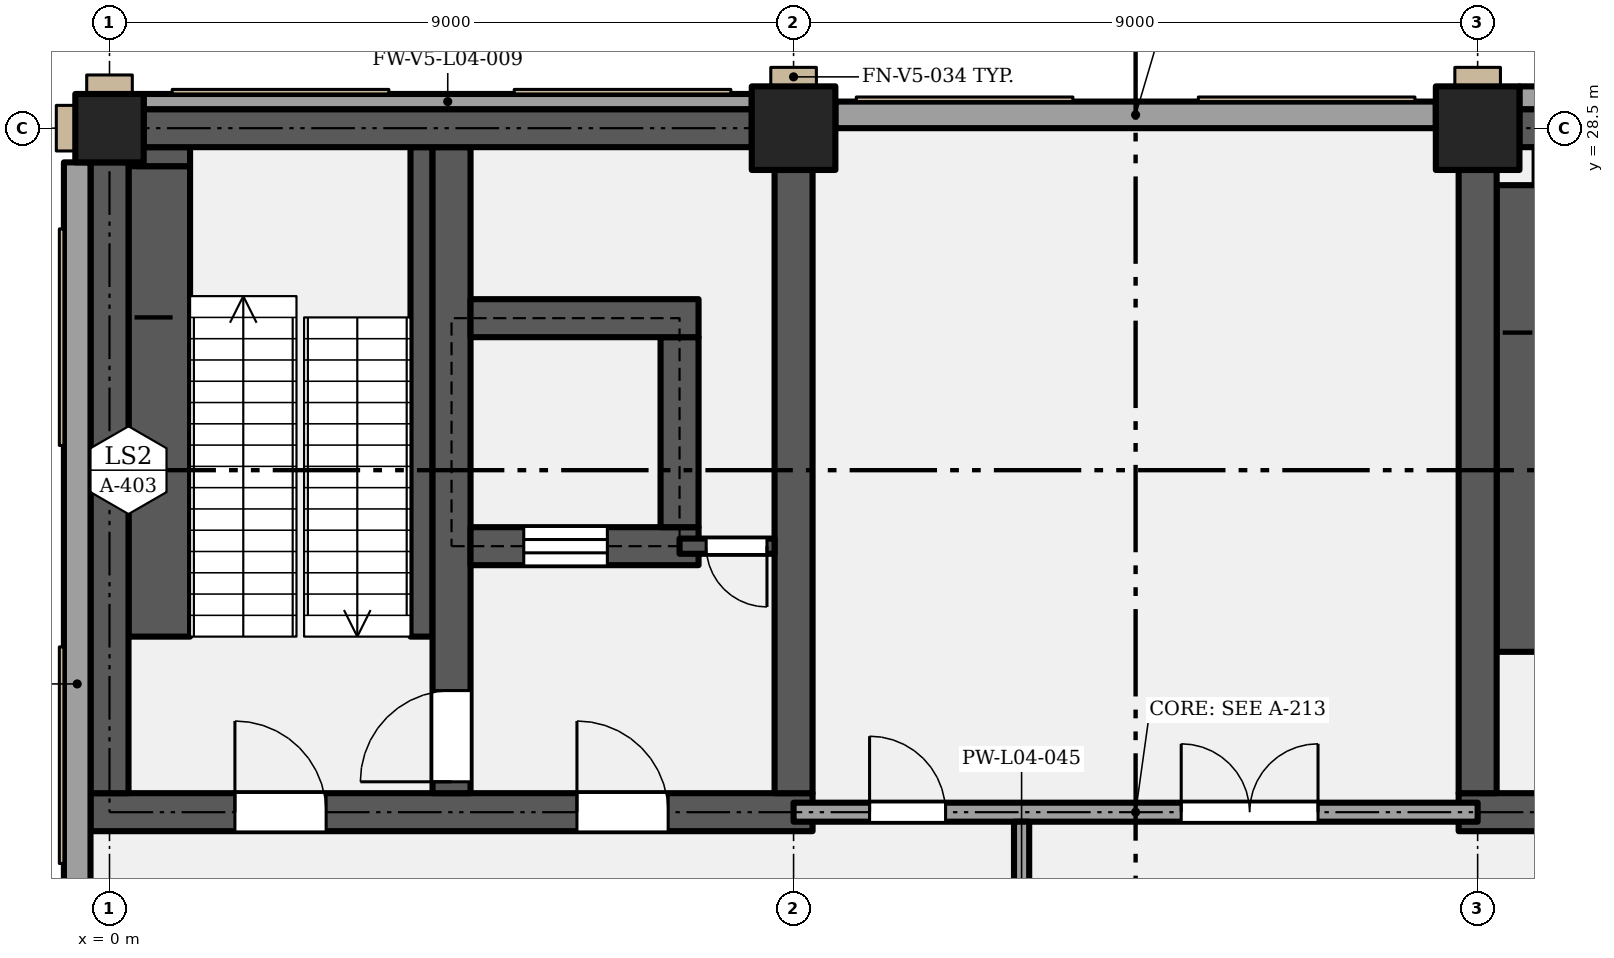
"""IFC4 building model, lengths in metres.
Left out: names, types, materials, properties, quantities, classifications, styles, units other than length and angle.
Written with IfcOpenShell. Run it as: python <this file> out.ifc"""

import sys

from ifc_helpers import new_model, si_unit, direction, frame, frame_2d, origin, origin_2d, place, context, subcontext, project, spatial, rectangle, extrude, element, fill, save


model = new_model("IFC4")
c1 = context("Model", 3, precision=1e-05, world=origin(), true_north=direction((0.0, 1.0)))
c2 = subcontext(c1, "Body", "Model", "MODEL_VIEW")
j1 = project(units=[si_unit("LENGTHUNIT", "METRE"), si_unit("PLANEANGLEUNIT", "RADIAN")], contexts=[c1])
p1 = place(None, origin())
s1 = spatial("IfcSite", under=j1, at=p1, CompositionType="ELEMENT")
p2 = place(p1, origin())
s2 = spatial("IfcBuilding", under=s1, at=p2, CompositionType="ELEMENT")
p3 = place(p2, frame((0.0, 0.0, 22.8)))
s3 = spatial("IfcBuildingStorey", under=s2, at=p3, CompositionType="ELEMENT", Elevation=22.8)
p4 = place(p3, frame((0.0, 28.5, 0.0), z_axis=(0.0, 0.0, 1.0), x_axis=(1.0, 0.0, 0.0)))
e1 = element("IfcColumn", 1, at=p4, inside=s3, PredefinedType="COLUMN", context=c2, shape_type="SweptSolid", body=[
    extrude(rectangle(XDim=0.9, YDim=0.9, at=origin_2d()), origin(), (0.0, 0.0, 1.0), 5.4),
])
for number, where, z_axis, x_axis in (
    (2, (9.0, 28.5, 0.0), (0.0, 0.0, 1.0), (1.0, 0.0, 0.0)),
    (3, (18.0, 28.5, 0.0), (0.0, 0.0, 1.0), (1.0, 0.0, 0.0)),
):
    element("IfcColumn", number, at=place(p3, frame(where, z_axis=z_axis, x_axis=x_axis)), inside=s3, PredefinedType="COLUMN", context=c2, shape_type="SweptSolid", body=[
        extrude(rectangle(XDim=1.1, YDim=1.1, at=origin_2d()), origin(), (0.0, 0.0, 1.0), 5.4),
    ])
p5 = place(p3, frame((-0.25, 19.5, 0.0), z_axis=(0.0, 0.0, 1.0), x_axis=(1.0, 0.0, 0.0)))
e4 = element("IfcWall", 4, at=p5, inside=s3, PredefinedType="SHEAR", context=c2, shape_type="SweptSolid", body=[
    extrude(rectangle(XDim=9.5, YDim=0.5, at=frame_2d((4.75, 0.0))), origin(), (0.0, 0.0, 1.0), 5.15),
])
p6 = place(p5, frame((1.9, 0.0, 0.0)))
e5 = element("IfcOpeningElement", 5, at=p6, cuts=e4, PredefinedType="OPENING", context=c2, shape_type="SweptSolid", body=[
    extrude(rectangle(XDim=1.2, YDim=2.1, at=frame_2d((0.6, 1.05))), frame((0.0, 0.26, 0.0), z_axis=(0.0, -1.0, 0.0), x_axis=(1.0, 0.0, 0.0)), (0.0, 0.0, 1.0), 0.52),
])
p7 = place(p5, frame((6.4, 0.0, 0.0)))
e6 = element("IfcOpeningElement", 6, at=p7, cuts=e4, PredefinedType="OPENING", context=c2, shape_type="SweptSolid", body=[
    extrude(rectangle(XDim=1.2, YDim=2.1, at=frame_2d((0.6, 1.05))), frame((0.0, 0.26, 0.0), z_axis=(0.0, -1.0, 0.0), x_axis=(1.0, 0.0, 0.0)), (0.0, 0.0, 1.0), 0.52),
])
p8 = place(p3, frame((17.75, 19.5, 0.0), z_axis=(0.0, 0.0, 1.0), x_axis=(1.0, 0.0, 0.0)))
e7 = element("IfcWall", 7, at=p8, inside=s3, PredefinedType="SHEAR", context=c2, shape_type="SweptSolid", body=[
    extrude(rectangle(XDim=9.5, YDim=0.5, at=frame_2d((4.75, 0.0))), origin(), (0.0, 0.0, 1.0), 5.15),
])
p9 = place(p8, frame((1.9, 0.0, 0.0)))
e8 = element("IfcOpeningElement", 8, at=p9, cuts=e7, PredefinedType="OPENING", context=c2, shape_type="SweptSolid", body=[
    extrude(rectangle(XDim=1.2, YDim=2.1, at=frame_2d((0.6, 1.05))), frame((0.0, 0.26, 0.0), z_axis=(0.0, -1.0, 0.0), x_axis=(1.0, 0.0, 0.0)), (0.0, 0.0, 1.0), 0.52),
])
p10 = place(p8, frame((7.95, 0.0, 0.0), z_axis=(0.0, 0.0, 1.0), x_axis=(-1.0, 0.0, 0.0)))
e9 = element("IfcOpeningElement", 9, at=p10, cuts=e7, PredefinedType="OPENING", context=c2, shape_type="SweptSolid", body=[
    extrude(rectangle(XDim=1.8, YDim=2.1, at=frame_2d((0.9, 1.05))), frame((0.0, 0.26, 0.0), z_axis=(0.0, -1.0, 0.0), x_axis=(1.0, 0.0, 0.0)), (0.0, 0.0, 1.0), 0.52),
])
p11 = place(p3, frame((0.0, 19.75, 0.0), z_axis=(0.0, 0.0, 1.0), x_axis=(0.0, 1.0, 0.0)))
e10 = element("IfcWall", 10, at=p11, inside=s3, PredefinedType="SHEAR", context=c2, shape_type="SweptSolid", body=[
    extrude(rectangle(XDim=8.3, YDim=0.5, at=frame_2d((4.15, 0.0))), origin(), (0.0, 0.0, 1.0), 5.15),
])
p12 = place(p3, frame((4.5, 19.75, 0.0), z_axis=(0.0, 0.0, 1.0), x_axis=(0.0, 1.0, 0.0)))
e11 = element("IfcWall", 11, at=p12, inside=s3, PredefinedType="SHEAR", context=c2, shape_type="SweptSolid", body=[
    extrude(rectangle(XDim=8.5, YDim=0.5, at=frame_2d((4.25, 0.0))), origin(), (0.0, 0.0, 1.0), 5.15),
])
p13 = place(p12, frame((0.15, 0.0, 0.0)))
e12 = element("IfcOpeningElement", 12, at=p13, cuts=e11, PredefinedType="OPENING", context=c2, shape_type="SweptSolid", body=[
    extrude(rectangle(XDim=1.2, YDim=2.1, at=frame_2d((0.6, 1.05))), frame((0.0, 0.26, 0.0), z_axis=(0.0, -1.0, 0.0), x_axis=(1.0, 0.0, 0.0)), (0.0, 0.0, 1.0), 0.52),
])
for number, where, z_axis, x_axis in (
    (13, (9.0, 19.75, 0.0), (0.0, 0.0, 1.0), (0.0, 1.0, 0.0)),
    (14, (18.0, 19.75, 0.0), (0.0, 0.0, 1.0), (0.0, 1.0, 0.0)),
):
    element("IfcWall", number, at=place(p3, frame(where, z_axis=z_axis, x_axis=x_axis)), inside=s3, PredefinedType="SHEAR", context=c2, shape_type="SweptSolid", body=[
        extrude(rectangle(XDim=8.2, YDim=0.5, at=frame_2d((4.1, 0.0))), origin(), (0.0, 0.0, 1.0), 5.15),
    ])
p14 = place(p3, frame((4.75, 23.0, 0.0), z_axis=(0.0, 0.0, 1.0), x_axis=(1.0, 0.0, 0.0)))
e15 = element("IfcWall", 15, at=p14, inside=s3, PredefinedType="SHEAR", context=c2, shape_type="SweptSolid", body=[
    extrude(rectangle(XDim=3.0, YDim=0.5, at=frame_2d((1.5, 0.0))), origin(), (0.0, 0.0, 1.0), 5.15),
])
p15 = place(p14, frame((0.7, 0.0, 0.0)))
e16 = element("IfcOpeningElement", 16, at=p15, cuts=e15, PredefinedType="OPENING", context=c2, shape_type="SweptSolid", body=[
    extrude(rectangle(XDim=1.1, YDim=2.1, at=frame_2d((0.55, 1.05))), frame((0.0, 0.26, 0.0), z_axis=(0.0, -1.0, 0.0), x_axis=(1.0, 0.0, 0.0)), (0.0, 0.0, 1.0), 0.52),
])
p16 = place(p3, frame((7.5, 23.25, 0.0), z_axis=(0.0, 0.0, 1.0), x_axis=(0.0, 1.0, 0.0)))
e17 = element("IfcWall", 17, at=p16, inside=s3, PredefinedType="SHEAR", context=c2, shape_type="SweptSolid", body=[
    extrude(rectangle(XDim=2.5, YDim=0.5, at=frame_2d((1.25, 0.0))), origin(), (0.0, 0.0, 1.0), 5.15),
])
p17 = place(p3, frame((4.75, 26.0, 0.0), z_axis=(0.0, 0.0, 1.0), x_axis=(1.0, 0.0, 0.0)))
e18 = element("IfcWall", 18, at=p17, inside=s3, PredefinedType="SHEAR", context=c2, shape_type="SweptSolid", body=[
    extrude(rectangle(XDim=3.0, YDim=0.5, at=frame_2d((1.5, 0.0))), origin(), (0.0, 0.0, 1.0), 5.15),
])
p18 = place(p3, frame((0.45, 28.5, 0.0), z_axis=(0.0, 0.0, 1.0), x_axis=(1.0, 0.0, 0.0)))
e19 = element("IfcWall", 19, at=p18, inside=s3, PredefinedType="SHEAR", context=c2, shape_type="SweptSolid", body=[
    extrude(rectangle(XDim=8.0, YDim=0.5, at=frame_2d((4.0, 0.0))), origin(), (0.0, 0.0, 1.0), 5.15),
])
p19 = place(p3, frame((18.55, 28.5, 0.0), z_axis=(0.0, 0.0, 1.0), x_axis=(1.0, 0.0, 0.0)))
e20 = element("IfcWall", 20, at=p19, inside=s3, PredefinedType="SHEAR", context=c2, shape_type="SweptSolid", body=[
    extrude(rectangle(XDim=7.9, YDim=0.5, at=frame_2d((3.95, 0.0))), origin(), (0.0, 0.0, 1.0), 5.15),
])
p20 = place(p3, frame((0.45, 28.85, 0.0), z_axis=(0.0, 0.0, 1.0), x_axis=(1.0, 0.0, 0.0)))
e21 = element("IfcWall", 21, at=p20, inside=s3, PredefinedType="SOLIDWALL", context=c2, shape_type="SweptSolid", body=[
    extrude(rectangle(XDim=8.0, YDim=0.2, at=frame_2d((4.0, 0.0))), origin(), (0.0, 0.0, 1.0), 5.15),
])
p21 = place(p3, frame((9.55, 28.675, 0.0), z_axis=(0.0, 0.0, 1.0), x_axis=(1.0, 0.0, 0.0)))
e22 = element("IfcWall", 22, at=p21, inside=s3, PredefinedType="SOLIDWALL", context=c2, shape_type="SweptSolid", body=[
    extrude(rectangle(XDim=7.9, YDim=0.35, at=frame_2d((3.95, 0.0))), origin(), (0.0, 0.0, 1.0), 5.15),
])
p22 = place(p3, frame((18.55, 28.9, 0.0), z_axis=(0.0, 0.0, 1.0), x_axis=(1.0, 0.0, 0.0)))
e23 = element("IfcWall", 23, at=p22, inside=s3, PredefinedType="SOLIDWALL", context=c2, shape_type="SweptSolid", body=[
    extrude(rectangle(XDim=7.9, YDim=0.3, at=frame_2d((3.95, 0.0))), origin(), (0.0, 0.0, 1.0), 5.15),
])
p23 = place(p3, frame((-0.425, 14.325, 0.0), z_axis=(0.0, 0.0, 1.0), x_axis=(0.0, 1.0, 0.0)))
e24 = element("IfcWall", 24, at=p23, inside=s3, PredefinedType="SOLIDWALL", context=c2, shape_type="SweptSolid", body=[
    extrude(rectangle(XDim=13.725, YDim=0.35, at=frame_2d((6.863, 0.0))), origin(), (0.0, 0.0, 1.0), 5.15),
])
p24 = place(p3, frame((9.0, 19.5, 0.0), z_axis=(0.0, 0.0, 1.0), x_axis=(1.0, 0.0, 0.0)))
e25 = element("IfcWall", 25, at=p24, inside=s3, PredefinedType="PARTITIONING", context=c2, shape_type="SweptSolid", body=[
    extrude(rectangle(XDim=9.0, YDim=0.25, at=frame_2d((4.5, 0.0))), origin(), (0.0, 0.0, 1.0), 5.15),
])
p25 = place(p24, frame((5.1, 0.0, 0.0)))
e26 = element("IfcOpeningElement", 26, at=p25, cuts=e25, PredefinedType="OPENING", context=c2, shape_type="SweptSolid", body=[
    extrude(rectangle(XDim=1.8, YDim=2.4, at=frame_2d((0.9, 1.2))), frame((0.0, 0.135, 0.0), z_axis=(0.0, -1.0, 0.0), x_axis=(1.0, 0.0, 0.0)), (0.0, 0.0, 1.0), 0.27),
])
p26 = place(p24, frame((1.0, 0.0, 0.0)))
e27 = element("IfcOpeningElement", 27, at=p26, cuts=e25, PredefinedType="OPENING", context=c2, shape_type="SweptSolid", body=[
    extrude(rectangle(XDim=1.0, YDim=2.1, at=frame_2d((0.5, 1.05))), frame((0.0, 0.135, 0.0), z_axis=(0.0, -1.0, 0.0), x_axis=(1.0, 0.0, 0.0)), (0.0, 0.0, 1.0), 0.27),
])
p27 = place(p3, frame((7.5, 23.0, 0.0), z_axis=(0.0, 0.0, 1.0), x_axis=(1.0, 0.0, 0.0)))
e28 = element("IfcWall", 28, at=p27, inside=s3, PredefinedType="SHEAR", context=c2, shape_type="SweptSolid", body=[
    extrude(rectangle(XDim=1.25, YDim=0.2, at=frame_2d((0.625, 0.0))), origin(), (0.0, 0.0, 1.0), 5.15),
])
p28 = place(p27, frame((1.15, 0.0, 0.0), z_axis=(0.0, 0.0, 1.0), x_axis=(-1.0, 0.0, 0.0)))
e29 = element("IfcOpeningElement", 29, at=p28, cuts=e28, PredefinedType="OPENING", context=c2, shape_type="SweptSolid", body=[
    extrude(rectangle(XDim=0.8, YDim=2.0, at=frame_2d((0.4, 1.0))), frame((0.0, 0.11, 0.0), z_axis=(0.0, -1.0, 0.0), x_axis=(1.0, 0.0, 0.0)), (0.0, 0.0, 1.0), 0.22),
])
p29 = place(p3, frame((12.0, 17.225, 0.0), z_axis=(0.0, 0.0, 1.0), x_axis=(0.0, 1.0, 0.0)))
e30 = element("IfcWall", 30, at=p29, inside=s3, PredefinedType="PARTITIONING", context=c2, shape_type="SweptSolid", body=[
    extrude(rectangle(XDim=2.15, YDim=0.2, at=frame_2d((1.075, 0.0))), origin(), (0.0, 0.0, 1.0), 5.15),
])
p30 = place(p3, frame((18.6, 21.61, 0.0), z_axis=(0.0, 0.0, 1.0), x_axis=(0.0, 1.0, 0.0)))
e31 = element("IfcWall", 31, at=p30, inside=s3, PredefinedType="SHEAR", context=c2, shape_type="SweptSolid", body=[
    extrude(rectangle(XDim=6.14, YDim=0.7, at=frame_2d((3.07, 0.0))), origin(), (0.0, 0.0, 1.0), 2.587),
])
p31 = place(p3, frame((0.655, 21.81, 0.0), z_axis=(0.0, 0.0, 1.0), x_axis=(0.0, 1.0, 0.0)))
e32 = element("IfcWall", 32, at=p31, inside=s3, PredefinedType="SHEAR", context=c2, shape_type="SweptSolid", body=[
    extrude(rectangle(XDim=6.19, YDim=0.81, at=frame_2d((3.095, 0.0))), origin(), (0.0, 0.0, 1.0), 2.587),
])
p32 = place(p3, frame((0.705, 28.0, 0.0), z_axis=(0.0, 0.0, 1.0), x_axis=(0.0, 1.0, 0.0)))
e33 = element("IfcWall", 33, at=p32, inside=s3, PredefinedType="SHEAR", context=c2, shape_type="SweptSolid", body=[
    extrude(rectangle(XDim=0.25, YDim=0.71, at=frame_2d((0.125, 0.0))), origin(), (0.0, 0.0, 1.0), 2.587),
])
p33 = place(p3, frame((4.105, 21.81, 0.0), z_axis=(0.0, 0.0, 1.0), x_axis=(0.0, 1.0, 0.0)))
e34 = element("IfcWall", 34, at=p33, inside=s3, PredefinedType="SHEAR", context=c2, shape_type="SweptSolid", body=[
    extrude(rectangle(XDim=6.44, YDim=0.29, at=frame_2d((3.22, 0.0))), origin(), (0.0, 0.0, 1.0), 2.587),
])
p34 = place(p6, origin())
e35 = element("IfcDoor", 35, at=p34, inside=s3, OperationType="SINGLE_SWING_LEFT", PredefinedType="DOOR", context=c2, shape_type="SweptSolid", body=[
    extrude(rectangle(XDim=1.2, YDim=2.1, at=frame_2d((0.6, 1.05))), frame((0.0, 0.025, 0.0), z_axis=(0.0, -1.0, 0.0), x_axis=(1.0, 0.0, 0.0)), (0.0, 0.0, 1.0), 0.05),
])
fill(e5, e35)
p35 = place(p13, origin())
e36 = element("IfcDoor", 36, at=p35, inside=s3, OperationType="SINGLE_SWING_LEFT", PredefinedType="DOOR", context=c2, shape_type="SweptSolid", body=[
    extrude(rectangle(XDim=1.2, YDim=2.1, at=frame_2d((0.6, 1.05))), frame((0.0, 0.025, 0.0), z_axis=(0.0, -1.0, 0.0), x_axis=(1.0, 0.0, 0.0)), (0.0, 0.0, 1.0), 0.05),
])
fill(e12, e36)
p36 = place(p7, origin())
e37 = element("IfcDoor", 37, at=p36, inside=s3, OperationType="SINGLE_SWING_LEFT", PredefinedType="DOOR", context=c2, shape_type="SweptSolid", body=[
    extrude(rectangle(XDim=1.2, YDim=2.1, at=frame_2d((0.6, 1.05))), frame((0.0, 0.025, 0.0), z_axis=(0.0, -1.0, 0.0), x_axis=(1.0, 0.0, 0.0)), (0.0, 0.0, 1.0), 0.05),
])
fill(e6, e37)
p37 = place(p15, origin())
e38 = element("IfcDoor", 38, at=p37, inside=s3, OperationType="SLIDING_TO_LEFT", PredefinedType="DOOR", context=c2, shape_type="SweptSolid", body=[
    extrude(rectangle(XDim=1.1, YDim=2.1, at=frame_2d((0.55, 1.05))), frame((0.0, 0.025, 0.0), z_axis=(0.0, -1.0, 0.0), x_axis=(1.0, 0.0, 0.0)), (0.0, 0.0, 1.0), 0.05),
])
fill(e16, e38)
p38 = place(p28, origin())
e39 = element("IfcDoor", 39, at=p38, inside=s3, OperationType="SINGLE_SWING_LEFT", PredefinedType="DOOR", context=c2, shape_type="SweptSolid", body=[
    extrude(rectangle(XDim=0.8, YDim=2.0, at=frame_2d((0.4, 1.0))), frame((0.0, 0.025, 0.0), z_axis=(0.0, -1.0, 0.0), x_axis=(1.0, 0.0, 0.0)), (0.0, 0.0, 1.0), 0.05),
])
fill(e29, e39)
p39 = place(p25, origin())
e40 = element("IfcDoor", 40, at=p39, inside=s3, OperationType="DOUBLE_DOOR_SINGLE_SWING", PredefinedType="DOOR", context=c2, shape_type="SweptSolid", body=[
    extrude(rectangle(XDim=1.8, YDim=2.4, at=frame_2d((0.9, 1.2))), frame((0.0, 0.025, 0.0), z_axis=(0.0, -1.0, 0.0), x_axis=(1.0, 0.0, 0.0)), (0.0, 0.0, 1.0), 0.05),
])
fill(e26, e40)
p40 = place(p26, origin())
e41 = element("IfcDoor", 41, at=p40, inside=s3, OperationType="SINGLE_SWING_LEFT", PredefinedType="DOOR", context=c2, shape_type="SweptSolid", body=[
    extrude(rectangle(XDim=1.0, YDim=2.1, at=frame_2d((0.5, 1.05))), frame((0.0, 0.025, 0.0), z_axis=(0.0, -1.0, 0.0), x_axis=(1.0, 0.0, 0.0)), (0.0, 0.0, 1.0), 0.05),
])
fill(e27, e41)
save(model, sys.argv[1])
